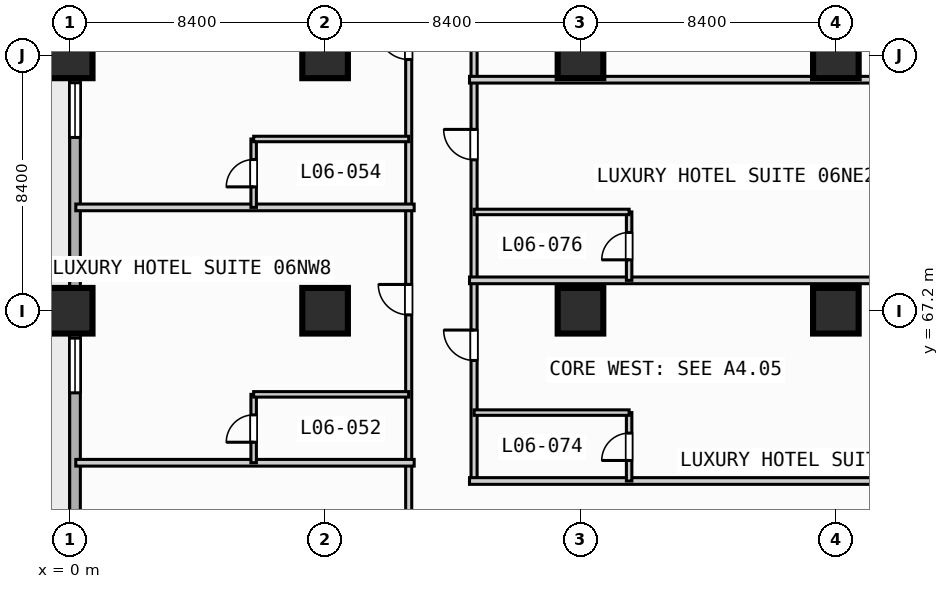
"""IFC4 building model, lengths in metres.
Left out: names, types, materials, properties, quantities, classifications, styles, units other than length and angle.
Written with IfcOpenShell. Run it as: python <this file> out.ifc"""

import sys

from ifc_helpers import new_model, si_unit, direction, frame, frame_2d, origin, origin_2d, place, context, subcontext, project, spatial, rectangle, extrude, element, fill, save


model = new_model("IFC4")
c1 = context("Model", 3, precision=1e-05, world=origin(), true_north=direction((0.0, 1.0)))
c2 = subcontext(c1, "Body", "Model", "MODEL_VIEW")
j1 = project(units=[si_unit("LENGTHUNIT", "METRE"), si_unit("PLANEANGLEUNIT", "RADIAN")], contexts=[c1])
p1 = place(None, origin())
s1 = spatial("IfcSite", under=j1, at=p1, CompositionType="ELEMENT")
p2 = place(p1, origin())
s2 = spatial("IfcBuilding", under=s1, at=p2, CompositionType="ELEMENT")
p3 = place(p2, frame((0.0, 0.0, 32.0)))
s3 = spatial("IfcBuildingStorey", under=s2, at=p3, CompositionType="ELEMENT", Elevation=32.0)
for number, where, z_axis, x_axis in (
    (1, (0.0, 67.2, 0.0), (0.0, 0.0, 1.0), (1.0, 0.0, 0.0)),
    (2, (0.0, 75.6, 0.0), (0.0, 0.0, 1.0), (1.0, 0.0, 0.0)),
    (3, (8.4, 67.2, 0.0), (0.0, 0.0, 1.0), (1.0, 0.0, 0.0)),
    (4, (8.4, 75.6, 0.0), (0.0, 0.0, 1.0), (1.0, 0.0, 0.0)),
    (5, (16.8, 67.2, 0.0), (0.0, 0.0, 1.0), (1.0, 0.0, 0.0)),
    (6, (16.8, 75.6, 0.0), (0.0, 0.0, 1.0), (1.0, 0.0, 0.0)),
    (7, (25.2, 67.2, 0.0), (0.0, 0.0, 1.0), (1.0, 0.0, 0.0)),
    (8, (25.2, 75.6, 0.0), (0.0, 0.0, 1.0), (1.0, 0.0, 0.0)),
):
    element("IfcColumn", number, at=place(p3, frame(where, z_axis=z_axis, x_axis=x_axis)), inside=s3, PredefinedType="COLUMN", context=c2, shape_type="SweptSolid", body=[
        extrude(rectangle(XDim=1.5, YDim=1.5, at=origin_2d()), origin(), (0.0, 0.0, 1.0), 3.8),
    ])
p4 = place(p3, frame((0.175, 3.175, 0.0), z_axis=(0.0, 0.0, 1.0), x_axis=(0.0, 1.0, 0.0)))
e9 = element("IfcWall", 9, at=p4, inside=s3, PredefinedType="STANDARD", context=c2, shape_type="SweptSolid", body=[
    extrude(rectangle(XDim=86.05, YDim=0.35, at=frame_2d((43.025, 0.0))), origin(), (0.0, 0.0, 1.0), 3.55),
])
p5 = place(p4, frame((42.825, 0.0, 0.0)))
e10 = element("IfcOpeningElement", 10, at=p5, cuts=e9, PredefinedType="OPENING", context=c2, shape_type="SweptSolid", body=[
    extrude(rectangle(XDim=1.4, YDim=2.2, at=frame_2d((0.7, 1.1))), frame((0.0, 0.185, 0.0), z_axis=(0.0, -1.0, 0.0), x_axis=(1.0, 0.0, 0.0)), (0.0, 0.0, 1.0), 0.37),
])
p6 = place(p4, frame((2.525, 0.0, 0.85)))
e11 = element("IfcOpeningElement", 11, at=p6, cuts=e9, PredefinedType="OPENING", context=c2, shape_type="SweptSolid", body=[
    extrude(rectangle(XDim=1.8, YDim=1.8, at=frame_2d((0.9, 0.9))), frame((0.0, 0.185, 0.0), z_axis=(0.0, -1.0, 0.0), x_axis=(1.0, 0.0, 0.0)), (0.0, 0.0, 1.0), 0.37),
])
p7 = place(p4, frame((10.925, 0.0, 0.85)))
e12 = element("IfcOpeningElement", 12, at=p7, cuts=e9, PredefinedType="OPENING", context=c2, shape_type="SweptSolid", body=[
    extrude(rectangle(XDim=1.8, YDim=1.8, at=frame_2d((0.9, 0.9))), frame((0.0, 0.185, 0.0), z_axis=(0.0, -1.0, 0.0), x_axis=(1.0, 0.0, 0.0)), (0.0, 0.0, 1.0), 0.37),
])
p8 = place(p4, frame((19.325, 0.0, 0.85)))
e13 = element("IfcOpeningElement", 13, at=p8, cuts=e9, PredefinedType="OPENING", context=c2, shape_type="SweptSolid", body=[
    extrude(rectangle(XDim=1.8, YDim=1.8, at=frame_2d((0.9, 0.9))), frame((0.0, 0.185, 0.0), z_axis=(0.0, -1.0, 0.0), x_axis=(1.0, 0.0, 0.0)), (0.0, 0.0, 1.0), 0.37),
])
p9 = place(p4, frame((27.725, 0.0, 0.85)))
e14 = element("IfcOpeningElement", 14, at=p9, cuts=e9, PredefinedType="OPENING", context=c2, shape_type="SweptSolid", body=[
    extrude(rectangle(XDim=1.8, YDim=1.8, at=frame_2d((0.9, 0.9))), frame((0.0, 0.185, 0.0), z_axis=(0.0, -1.0, 0.0), x_axis=(1.0, 0.0, 0.0)), (0.0, 0.0, 1.0), 0.37),
])
p10 = place(p4, frame((36.125, 0.0, 0.85)))
e15 = element("IfcOpeningElement", 15, at=p10, cuts=e9, PredefinedType="OPENING", context=c2, shape_type="SweptSolid", body=[
    extrude(rectangle(XDim=1.8, YDim=1.8, at=frame_2d((0.9, 0.9))), frame((0.0, 0.185, 0.0), z_axis=(0.0, -1.0, 0.0), x_axis=(1.0, 0.0, 0.0)), (0.0, 0.0, 1.0), 0.37),
])
p11 = place(p4, frame((52.925, 0.0, 0.85)))
e16 = element("IfcOpeningElement", 16, at=p11, cuts=e9, PredefinedType="OPENING", context=c2, shape_type="SweptSolid", body=[
    extrude(rectangle(XDim=1.8, YDim=1.8, at=frame_2d((0.9, 0.9))), frame((0.0, 0.185, 0.0), z_axis=(0.0, -1.0, 0.0), x_axis=(1.0, 0.0, 0.0)), (0.0, 0.0, 1.0), 0.37),
])
p12 = place(p4, frame((61.325, 0.0, 0.85)))
e17 = element("IfcOpeningElement", 17, at=p12, cuts=e9, PredefinedType="OPENING", context=c2, shape_type="SweptSolid", body=[
    extrude(rectangle(XDim=1.8, YDim=1.8, at=frame_2d((0.9, 0.9))), frame((0.0, 0.185, 0.0), z_axis=(0.0, -1.0, 0.0), x_axis=(1.0, 0.0, 0.0)), (0.0, 0.0, 1.0), 0.37),
])
p13 = place(p4, frame((69.725, 0.0, 0.85)))
e18 = element("IfcOpeningElement", 18, at=p13, cuts=e9, PredefinedType="OPENING", context=c2, shape_type="SweptSolid", body=[
    extrude(rectangle(XDim=1.8, YDim=1.8, at=frame_2d((0.9, 0.9))), frame((0.0, 0.185, 0.0), z_axis=(0.0, -1.0, 0.0), x_axis=(1.0, 0.0, 0.0)), (0.0, 0.0, 1.0), 0.37),
])
p14 = place(p4, frame((78.075, 0.0, 0.85)))
e19 = element("IfcOpeningElement", 19, at=p14, cuts=e9, PredefinedType="OPENING", context=c2, shape_type="SweptSolid", body=[
    extrude(rectangle(XDim=1.8, YDim=1.8, at=frame_2d((0.9, 0.9))), frame((0.0, 0.185, 0.0), z_axis=(0.0, -1.0, 0.0), x_axis=(1.0, 0.0, 0.0)), (0.0, 0.0, 1.0), 0.37),
])
p15 = place(p3, frame((11.15, 3.4, 0.0), z_axis=(0.0, 0.0, 1.0), x_axis=(0.0, 1.0, 0.0)))
e20 = element("IfcWall", 20, at=p15, inside=s3, PredefinedType="PARTITIONING", context=c2, shape_type="SweptSolid", body=[
    extrude(rectangle(XDim=85.4, YDim=0.2, at=frame_2d((42.7, 0.0))), origin(), (0.0, 0.0, 1.0), 3.55),
])
p16 = place(p15, frame((4.865, 0.0, 0.0)))
e21 = element("IfcOpeningElement", 21, at=p16, cuts=e20, PredefinedType="OPENING", context=c2, shape_type="SweptSolid", body=[
    extrude(rectangle(XDim=1.0, YDim=2.15, at=frame_2d((0.5, 1.075))), frame((0.0, 0.11, 0.0), z_axis=(0.0, -1.0, 0.0), x_axis=(1.0, 0.0, 0.0)), (0.0, 0.0, 1.0), 0.22),
])
p17 = place(p15, frame((13.265, 0.0, 0.0)))
e22 = element("IfcOpeningElement", 22, at=p17, cuts=e20, PredefinedType="OPENING", context=c2, shape_type="SweptSolid", body=[
    extrude(rectangle(XDim=1.0, YDim=2.15, at=frame_2d((0.5, 1.075))), frame((0.0, 0.11, 0.0), z_axis=(0.0, -1.0, 0.0), x_axis=(1.0, 0.0, 0.0)), (0.0, 0.0, 1.0), 0.22),
])
p18 = place(p15, frame((21.665, 0.0, 0.0)))
e23 = element("IfcOpeningElement", 23, at=p18, cuts=e20, PredefinedType="OPENING", context=c2, shape_type="SweptSolid", body=[
    extrude(rectangle(XDim=1.0, YDim=2.15, at=frame_2d((0.5, 1.075))), frame((0.0, 0.11, 0.0), z_axis=(0.0, -1.0, 0.0), x_axis=(1.0, 0.0, 0.0)), (0.0, 0.0, 1.0), 0.22),
])
p19 = place(p15, frame((30.065, 0.0, 0.0)))
e24 = element("IfcOpeningElement", 24, at=p19, cuts=e20, PredefinedType="OPENING", context=c2, shape_type="SweptSolid", body=[
    extrude(rectangle(XDim=1.0, YDim=2.15, at=frame_2d((0.5, 1.075))), frame((0.0, 0.11, 0.0), z_axis=(0.0, -1.0, 0.0), x_axis=(1.0, 0.0, 0.0)), (0.0, 0.0, 1.0), 0.22),
])
p20 = place(p15, frame((38.465, 0.0, 0.0)))
e25 = element("IfcOpeningElement", 25, at=p20, cuts=e20, PredefinedType="OPENING", context=c2, shape_type="SweptSolid", body=[
    extrude(rectangle(XDim=1.0, YDim=2.15, at=frame_2d((0.5, 1.075))), frame((0.0, 0.11, 0.0), z_axis=(0.0, -1.0, 0.0), x_axis=(1.0, 0.0, 0.0)), (0.0, 0.0, 1.0), 0.22),
])
p21 = place(p15, frame((46.865, 0.0, 0.0)))
e26 = element("IfcOpeningElement", 26, at=p21, cuts=e20, PredefinedType="OPENING", context=c2, shape_type="SweptSolid", body=[
    extrude(rectangle(XDim=1.0, YDim=2.15, at=frame_2d((0.5, 1.075))), frame((0.0, 0.11, 0.0), z_axis=(0.0, -1.0, 0.0), x_axis=(1.0, 0.0, 0.0)), (0.0, 0.0, 1.0), 0.22),
])
p22 = place(p15, frame((55.265, 0.0, 0.0)))
e27 = element("IfcOpeningElement", 27, at=p22, cuts=e20, PredefinedType="OPENING", context=c2, shape_type="SweptSolid", body=[
    extrude(rectangle(XDim=1.0, YDim=2.15, at=frame_2d((0.5, 1.075))), frame((0.0, 0.11, 0.0), z_axis=(0.0, -1.0, 0.0), x_axis=(1.0, 0.0, 0.0)), (0.0, 0.0, 1.0), 0.22),
])
p23 = place(p15, frame((63.665, 0.0, 0.0)))
e28 = element("IfcOpeningElement", 28, at=p23, cuts=e20, PredefinedType="OPENING", context=c2, shape_type="SweptSolid", body=[
    extrude(rectangle(XDim=1.0, YDim=2.15, at=frame_2d((0.5, 1.075))), frame((0.0, 0.11, 0.0), z_axis=(0.0, -1.0, 0.0), x_axis=(1.0, 0.0, 0.0)), (0.0, 0.0, 1.0), 0.22),
])
p24 = place(p15, frame((72.065, 0.0, 0.0)))
e29 = element("IfcOpeningElement", 29, at=p24, cuts=e20, PredefinedType="OPENING", context=c2, shape_type="SweptSolid", body=[
    extrude(rectangle(XDim=1.0, YDim=2.15, at=frame_2d((0.5, 1.075))), frame((0.0, 0.11, 0.0), z_axis=(0.0, -1.0, 0.0), x_axis=(1.0, 0.0, 0.0)), (0.0, 0.0, 1.0), 0.22),
])
p25 = place(p15, frame((81.165, 0.0, 0.0)))
e30 = element("IfcOpeningElement", 30, at=p25, cuts=e20, PredefinedType="OPENING", context=c2, shape_type="SweptSolid", body=[
    extrude(rectangle(XDim=1.0, YDim=2.15, at=frame_2d((0.5, 1.075))), frame((0.0, 0.11, 0.0), z_axis=(0.0, -1.0, 0.0), x_axis=(1.0, 0.0, 0.0)), (0.0, 0.0, 1.0), 0.22),
])
p26 = place(p3, frame((0.2, 62.2, 0.0), z_axis=(0.0, 0.0, 1.0), x_axis=(1.0, 0.0, 0.0)))
e31 = element("IfcWall", 31, at=p26, inside=s3, PredefinedType="PARTITIONING", context=c2, shape_type="SweptSolid", body=[
    extrude(rectangle(XDim=11.13, YDim=0.22, at=frame_2d((5.565, 0.0))), origin(), (0.0, 0.0, 1.0), 3.55),
])
p27 = place(p3, frame((6.05, 62.2, 0.0), z_axis=(0.0, 0.0, 1.0), x_axis=(0.0, 1.0, 0.0)))
e32 = element("IfcWall", 32, at=p27, inside=s3, PredefinedType="PLUMBINGWALL", context=c2, shape_type="SweptSolid", body=[
    extrude(rectangle(XDim=2.25, YDim=0.18, at=frame_2d((1.125, 0.0))), origin(), (0.0, 0.0, 1.0), 3.55),
])
p28 = place(p27, frame((0.675, 0.0, 0.0)))
e33 = element("IfcOpeningElement", 33, at=p28, cuts=e32, PredefinedType="OPENING", context=c2, shape_type="SweptSolid", body=[
    extrude(rectangle(XDim=0.9, YDim=2.1, at=frame_2d((0.45, 1.05))), frame((0.0, 0.1, 0.0), z_axis=(0.0, -1.0, 0.0), x_axis=(1.0, 0.0, 0.0)), (0.0, 0.0, 1.0), 0.2),
])
p29 = place(p3, frame((6.05, 64.45, 0.0), z_axis=(0.0, 0.0, 1.0), x_axis=(1.0, 0.0, 0.0)))
e34 = element("IfcWall", 34, at=p29, inside=s3, PredefinedType="PLUMBINGWALL", context=c2, shape_type="SweptSolid", body=[
    extrude(rectangle(XDim=5.1, YDim=0.18, at=frame_2d((2.55, 0.0))), origin(), (0.0, 0.0, 1.0), 3.55),
])
p30 = place(p3, frame((0.2, 70.6, 0.0), z_axis=(0.0, 0.0, 1.0), x_axis=(1.0, 0.0, 0.0)))
e35 = element("IfcWall", 35, at=p30, inside=s3, PredefinedType="PARTITIONING", context=c2, shape_type="SweptSolid", body=[
    extrude(rectangle(XDim=11.13, YDim=0.22, at=frame_2d((5.565, 0.0))), origin(), (0.0, 0.0, 1.0), 3.55),
])
p31 = place(p3, frame((6.05, 70.6, 0.0), z_axis=(0.0, 0.0, 1.0), x_axis=(0.0, 1.0, 0.0)))
e36 = element("IfcWall", 36, at=p31, inside=s3, PredefinedType="PLUMBINGWALL", context=c2, shape_type="SweptSolid", body=[
    extrude(rectangle(XDim=2.25, YDim=0.18, at=frame_2d((1.125, 0.0))), origin(), (0.0, 0.0, 1.0), 3.55),
])
p32 = place(p31, frame((0.675, 0.0, 0.0)))
e37 = element("IfcOpeningElement", 37, at=p32, cuts=e36, PredefinedType="OPENING", context=c2, shape_type="SweptSolid", body=[
    extrude(rectangle(XDim=0.9, YDim=2.1, at=frame_2d((0.45, 1.05))), frame((0.0, 0.1, 0.0), z_axis=(0.0, -1.0, 0.0), x_axis=(1.0, 0.0, 0.0)), (0.0, 0.0, 1.0), 0.2),
])
p33 = place(p3, frame((6.05, 72.85, 0.0), z_axis=(0.0, 0.0, 1.0), x_axis=(1.0, 0.0, 0.0)))
e38 = element("IfcWall", 38, at=p33, inside=s3, PredefinedType="PLUMBINGWALL", context=c2, shape_type="SweptSolid", body=[
    extrude(rectangle(XDim=5.1, YDim=0.18, at=frame_2d((2.55, 0.0))), origin(), (0.0, 0.0, 1.0), 3.55),
])
p34 = place(p3, frame((13.3, 61.6, 0.0), z_axis=(0.0, 0.0, 1.0), x_axis=(0.0, 1.0, 0.0)))
e39 = element("IfcWall", 39, at=p34, inside=s3, PredefinedType="PARTITIONING", context=c2, shape_type="SweptSolid", body=[
    extrude(rectangle(XDim=27.2, YDim=0.2, at=frame_2d((13.6, 0.0))), origin(), (0.0, 0.0, 1.0), 3.55),
])
p35 = place(p34, frame((3.965, 0.0, 0.0)))
e40 = element("IfcOpeningElement", 40, at=p35, cuts=e39, PredefinedType="OPENING", context=c2, shape_type="SweptSolid", body=[
    extrude(rectangle(XDim=1.0, YDim=2.15, at=frame_2d((0.5, 1.075))), frame((0.0, 0.11, 0.0), z_axis=(0.0, -1.0, 0.0), x_axis=(1.0, 0.0, 0.0)), (0.0, 0.0, 1.0), 0.22),
])
p36 = place(p34, frame((10.565, 0.0, 0.0)))
e41 = element("IfcOpeningElement", 41, at=p36, cuts=e39, PredefinedType="OPENING", context=c2, shape_type="SweptSolid", body=[
    extrude(rectangle(XDim=1.0, YDim=2.15, at=frame_2d((0.5, 1.075))), frame((0.0, 0.11, 0.0), z_axis=(0.0, -1.0, 0.0), x_axis=(1.0, 0.0, 0.0)), (0.0, 0.0, 1.0), 0.22),
])
p37 = place(p34, frame((15.035, 0.0, 0.0)))
e42 = element("IfcOpeningElement", 42, at=p37, cuts=e39, PredefinedType="OPENING", context=c2, shape_type="SweptSolid", body=[
    extrude(rectangle(XDim=1.0, YDim=2.15, at=frame_2d((0.5, 1.075))), frame((0.0, 0.11, 0.0), z_axis=(0.0, -1.0, 0.0), x_axis=(1.0, 0.0, 0.0)), (0.0, 0.0, 1.0), 0.22),
])
p38 = place(p34, frame((22.035, 0.0, 0.0)))
e43 = element("IfcOpeningElement", 43, at=p38, cuts=e39, PredefinedType="OPENING", context=c2, shape_type="SweptSolid", body=[
    extrude(rectangle(XDim=1.0, YDim=2.15, at=frame_2d((0.5, 1.075))), frame((0.0, 0.11, 0.0), z_axis=(0.0, -1.0, 0.0), x_axis=(1.0, 0.0, 0.0)), (0.0, 0.0, 1.0), 0.22),
])
p39 = place(p3, frame((13.15, 61.6, 0.0), z_axis=(0.0, 0.0, 1.0), x_axis=(1.0, 0.0, 0.0)))
e44 = element("IfcWall", 44, at=p39, inside=s3, PredefinedType="PARTITIONING", context=c2, shape_type="SweptSolid", body=[
    extrude(rectangle(XDim=20.28, YDim=0.22, at=frame_2d((10.14, 0.0))), origin(), (0.0, 0.0, 1.0), 3.55),
])
p40 = place(p3, frame((18.4, 61.6, 0.0), z_axis=(0.0, 0.0, 1.0), x_axis=(0.0, 1.0, 0.0)))
e45 = element("IfcWall", 45, at=p40, inside=s3, PredefinedType="PLUMBINGWALL", context=c2, shape_type="SweptSolid", body=[
    extrude(rectangle(XDim=2.25, YDim=0.18, at=frame_2d((1.125, 0.0))), origin(), (0.0, 0.0, 1.0), 3.55),
])
p41 = place(p40, frame((0.675, 0.0, 0.0)))
e46 = element("IfcOpeningElement", 46, at=p41, cuts=e45, PredefinedType="OPENING", context=c2, shape_type="SweptSolid", body=[
    extrude(rectangle(XDim=0.9, YDim=2.1, at=frame_2d((0.45, 1.05))), frame((0.0, 0.1, 0.0), z_axis=(0.0, -1.0, 0.0), x_axis=(1.0, 0.0, 0.0)), (0.0, 0.0, 1.0), 0.2),
])
p42 = place(p3, frame((13.3, 63.85, 0.0), z_axis=(0.0, 0.0, 1.0), x_axis=(1.0, 0.0, 0.0)))
e47 = element("IfcWall", 47, at=p42, inside=s3, PredefinedType="PLUMBINGWALL", context=c2, shape_type="SweptSolid", body=[
    extrude(rectangle(XDim=5.1, YDim=0.18, at=frame_2d((2.55, 0.0))), origin(), (0.0, 0.0, 1.0), 3.55),
])
p43 = place(p3, frame((13.15, 68.2, 0.0), z_axis=(0.0, 0.0, 1.0), x_axis=(1.0, 0.0, 0.0)))
e48 = element("IfcWall", 48, at=p43, inside=s3, PredefinedType="PARTITIONING", context=c2, shape_type="SweptSolid", body=[
    extrude(rectangle(XDim=20.28, YDim=0.22, at=frame_2d((10.14, 0.0))), origin(), (0.0, 0.0, 1.0), 3.55),
])
p44 = place(p3, frame((18.4, 68.2, 0.0), z_axis=(0.0, 0.0, 1.0), x_axis=(0.0, 1.0, 0.0)))
e49 = element("IfcWall", 49, at=p44, inside=s3, PredefinedType="PLUMBINGWALL", context=c2, shape_type="SweptSolid", body=[
    extrude(rectangle(XDim=2.25, YDim=0.18, at=frame_2d((1.125, 0.0))), origin(), (0.0, 0.0, 1.0), 3.55),
])
p45 = place(p44, frame((0.675, 0.0, 0.0)))
e50 = element("IfcOpeningElement", 50, at=p45, cuts=e49, PredefinedType="OPENING", context=c2, shape_type="SweptSolid", body=[
    extrude(rectangle(XDim=0.9, YDim=2.1, at=frame_2d((0.45, 1.05))), frame((0.0, 0.1, 0.0), z_axis=(0.0, -1.0, 0.0), x_axis=(1.0, 0.0, 0.0)), (0.0, 0.0, 1.0), 0.2),
])
p46 = place(p3, frame((13.3, 70.45, 0.0), z_axis=(0.0, 0.0, 1.0), x_axis=(1.0, 0.0, 0.0)))
e51 = element("IfcWall", 51, at=p46, inside=s3, PredefinedType="PLUMBINGWALL", context=c2, shape_type="SweptSolid", body=[
    extrude(rectangle(XDim=5.1, YDim=0.18, at=frame_2d((2.55, 0.0))), origin(), (0.0, 0.0, 1.0), 3.55),
])
p47 = place(p3, frame((13.15, 74.8, 0.0), z_axis=(0.0, 0.0, 1.0), x_axis=(1.0, 0.0, 0.0)))
e52 = element("IfcWall", 52, at=p47, inside=s3, PredefinedType="PARTITIONING", context=c2, shape_type="SweptSolid", body=[
    extrude(rectangle(XDim=20.28, YDim=0.22, at=frame_2d((10.14, 0.0))), origin(), (0.0, 0.0, 1.0), 3.55),
])
p48 = place(p12, origin())
e53 = element("IfcWindow", 53, at=p48, inside=s3, PartitioningType="SINGLE_PANEL", PredefinedType="WINDOW", context=c2, shape_type="SweptSolid", body=[
    extrude(rectangle(XDim=1.8, YDim=1.8, at=frame_2d((0.9, 0.9))), frame((0.0, 0.03, 0.0), z_axis=(0.0, -1.0, 0.0), x_axis=(1.0, 0.0, 0.0)), (0.0, 0.0, 1.0), 0.06),
])
fill(e17, e53)
p49 = place(p13, origin())
e54 = element("IfcWindow", 54, at=p49, inside=s3, PartitioningType="SINGLE_PANEL", PredefinedType="WINDOW", context=c2, shape_type="SweptSolid", body=[
    extrude(rectangle(XDim=1.8, YDim=1.8, at=frame_2d((0.9, 0.9))), frame((0.0, 0.03, 0.0), z_axis=(0.0, -1.0, 0.0), x_axis=(1.0, 0.0, 0.0)), (0.0, 0.0, 1.0), 0.06),
])
fill(e18, e54)
p50 = place(p23, origin())
e55 = element("IfcDoor", 55, at=p50, inside=s3, OperationType="SINGLE_SWING_RIGHT", PredefinedType="DOOR", context=c2, shape_type="SweptSolid", body=[
    extrude(rectangle(XDim=1.0, YDim=2.15, at=frame_2d((0.5, 1.075))), frame((0.0, 0.025, 0.0), z_axis=(0.0, -1.0, 0.0), x_axis=(1.0, 0.0, 0.0)), (0.0, 0.0, 1.0), 0.05),
])
fill(e28, e55)
p51 = place(p24, origin())
e56 = element("IfcDoor", 56, at=p51, inside=s3, OperationType="SINGLE_SWING_RIGHT", PredefinedType="DOOR", context=c2, shape_type="SweptSolid", body=[
    extrude(rectangle(XDim=1.0, YDim=2.15, at=frame_2d((0.5, 1.075))), frame((0.0, 0.025, 0.0), z_axis=(0.0, -1.0, 0.0), x_axis=(1.0, 0.0, 0.0)), (0.0, 0.0, 1.0), 0.05),
])
fill(e29, e56)
p52 = place(p28, origin())
e57 = element("IfcDoor", 57, at=p52, inside=s3, OperationType="SINGLE_SWING_LEFT", PredefinedType="DOOR", context=c2, shape_type="SweptSolid", body=[
    extrude(rectangle(XDim=0.9, YDim=2.1, at=frame_2d((0.45, 1.05))), frame((0.0, 0.025, 0.0), z_axis=(0.0, -1.0, 0.0), x_axis=(1.0, 0.0, 0.0)), (0.0, 0.0, 1.0), 0.05),
])
fill(e33, e57)
p53 = place(p32, origin())
e58 = element("IfcDoor", 58, at=p53, inside=s3, OperationType="SINGLE_SWING_LEFT", PredefinedType="DOOR", context=c2, shape_type="SweptSolid", body=[
    extrude(rectangle(XDim=0.9, YDim=2.1, at=frame_2d((0.45, 1.05))), frame((0.0, 0.025, 0.0), z_axis=(0.0, -1.0, 0.0), x_axis=(1.0, 0.0, 0.0)), (0.0, 0.0, 1.0), 0.05),
])
fill(e37, e58)
p54 = place(p35, origin())
e59 = element("IfcDoor", 59, at=p54, inside=s3, OperationType="SINGLE_SWING_RIGHT", PredefinedType="DOOR", context=c2, shape_type="SweptSolid", body=[
    extrude(rectangle(XDim=1.0, YDim=2.15, at=frame_2d((0.5, 1.075))), frame((0.0, 0.025, 0.0), z_axis=(0.0, -1.0, 0.0), x_axis=(1.0, 0.0, 0.0)), (0.0, 0.0, 1.0), 0.05),
])
fill(e40, e59)
p55 = place(p36, origin())
e60 = element("IfcDoor", 60, at=p55, inside=s3, OperationType="SINGLE_SWING_RIGHT", PredefinedType="DOOR", context=c2, shape_type="SweptSolid", body=[
    extrude(rectangle(XDim=1.0, YDim=2.15, at=frame_2d((0.5, 1.075))), frame((0.0, 0.025, 0.0), z_axis=(0.0, -1.0, 0.0), x_axis=(1.0, 0.0, 0.0)), (0.0, 0.0, 1.0), 0.05),
])
fill(e41, e60)
p56 = place(p41, origin())
e61 = element("IfcDoor", 61, at=p56, inside=s3, OperationType="SINGLE_SWING_LEFT", PredefinedType="DOOR", context=c2, shape_type="SweptSolid", body=[
    extrude(rectangle(XDim=0.9, YDim=2.1, at=frame_2d((0.45, 1.05))), frame((0.0, 0.025, 0.0), z_axis=(0.0, -1.0, 0.0), x_axis=(1.0, 0.0, 0.0)), (0.0, 0.0, 1.0), 0.05),
])
fill(e46, e61)
p57 = place(p45, origin())
e62 = element("IfcDoor", 62, at=p57, inside=s3, OperationType="SINGLE_SWING_LEFT", PredefinedType="DOOR", context=c2, shape_type="SweptSolid", body=[
    extrude(rectangle(XDim=0.9, YDim=2.1, at=frame_2d((0.45, 1.05))), frame((0.0, 0.025, 0.0), z_axis=(0.0, -1.0, 0.0), x_axis=(1.0, 0.0, 0.0)), (0.0, 0.0, 1.0), 0.05),
])
fill(e50, e62)
save(model, sys.argv[1])
